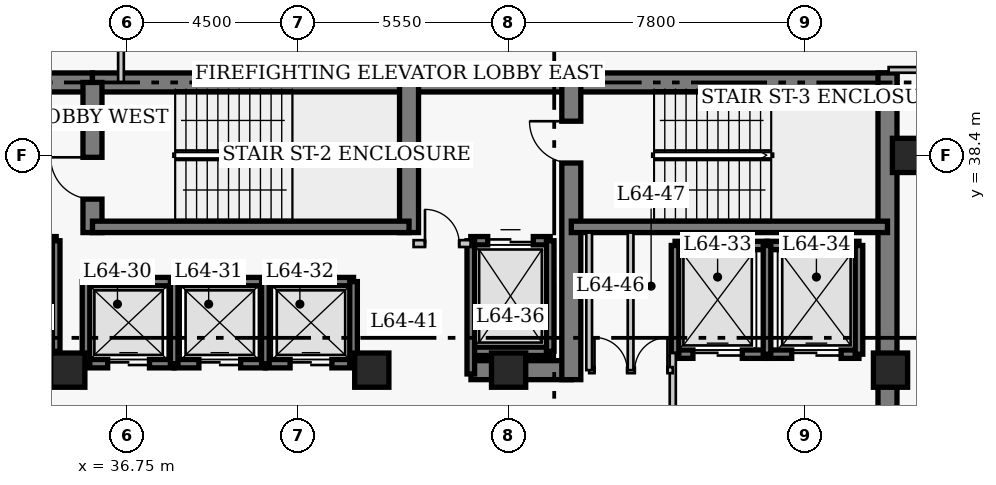
"""IFC4 building model, lengths in metres.
Left out: names, types, materials, properties, quantities, classifications, styles, units other than length and angle.
Written with IfcOpenShell. Run it as: python <this file> out.ifc"""

import sys

from ifc_helpers import new_model, si_unit, direction, frame, frame_2d, origin, origin_2d, place, context, subcontext, project, spatial, rectangle, extrude, element, fill, save


model = new_model("IFC4")
c1 = context("Model", 3, precision=1e-05, world=origin(), true_north=direction((0.0, 1.0)))
c2 = subcontext(c1, "Body", "Model", "MODEL_VIEW")
j1 = project(units=[si_unit("LENGTHUNIT", "METRE"), si_unit("PLANEANGLEUNIT", "RADIAN")], contexts=[c1])
p1 = place(None, origin())
s1 = spatial("IfcSite", under=j1, at=p1, CompositionType="ELEMENT")
p2 = place(p1, origin())
s2 = spatial("IfcBuilding", under=s1, at=p2, CompositionType="ELEMENT")
p3 = place(p2, frame((0.0, 0.0, 257.4)))
s3 = spatial("IfcBuildingStorey", under=s2, at=p3, CompositionType="ELEMENT", Elevation=257.4)
p4 = place(p3, frame((21.65, 40.32, 0.0), z_axis=(0.0, 0.0, 1.0), x_axis=(1.0, 0.0, 0.0)))
e1 = element("IfcWall", 1, at=p4, inside=s3, PredefinedType="SHEAR", context=c2, shape_type="SweptSolid", body=[
    extrude(rectangle(XDim=14.2, YDim=0.5, at=frame_2d((7.1, 0.0))), origin(), (0.0, 0.0, 1.0), 4.0),
])
p5 = place(p3, frame((35.85, 40.32, 0.0), z_axis=(0.0, 0.0, 1.0), x_axis=(1.0, 0.0, 0.0)))
e2 = element("IfcWall", 2, at=p5, inside=s3, PredefinedType="SHEAR", context=c2, shape_type="SweptSolid", body=[
    extrude(rectangle(XDim=12.6, YDim=0.5, at=frame_2d((6.3, 0.0))), origin(), (0.0, 0.0, 1.0), 4.0),
])
p6 = place(p3, frame((48.45, 40.32, 0.0), z_axis=(0.0, 0.0, 1.0), x_axis=(1.0, 0.0, 0.0)))
e3 = element("IfcWall", 3, at=p6, inside=s3, PredefinedType="SHEAR", context=c2, shape_type="SweptSolid", body=[
    extrude(rectangle(XDim=8.57, YDim=0.5, at=frame_2d((4.285, 0.0))), origin(), (0.0, 0.0, 1.0), 4.0),
])
p7 = place(p3, frame((56.77, 27.05, 0.0), z_axis=(0.0, 0.0, 1.0), x_axis=(0.0, 1.0, 0.0)))
e4 = element("IfcWall", 4, at=p7, inside=s3, PredefinedType="SHEAR", context=c2, shape_type="SweptSolid", body=[
    extrude(rectangle(XDim=13.52, YDim=0.5, at=frame_2d((6.76, 0.0))), origin(), (0.0, 0.0, 1.0), 4.0),
])
p8 = place(p3, frame((45.81, 32.75, 0.0), z_axis=(0.0, 0.0, 1.0), x_axis=(1.0, 0.0, 0.0)))
e5 = element("IfcWall", 5, at=p8, inside=s3, PredefinedType="SHEAR", context=c2, shape_type="SweptSolid", body=[
    extrude(rectangle(XDim=2.64, YDim=0.5, at=frame_2d((1.32, 0.0))), origin(), (0.0, 0.0, 1.0), 4.0),
])
p9 = place(p3, frame((35.85, 36.37, 0.0), z_axis=(0.0, 0.0, 1.0), x_axis=(0.0, 1.0, 0.0)))
e6 = element("IfcWall", 6, at=p9, inside=s3, PredefinedType="SHEAR", context=c2, shape_type="SweptSolid", body=[
    extrude(rectangle(XDim=3.95, YDim=0.5, at=frame_2d((1.975, 0.0))), origin(), (0.0, 0.0, 1.0), 4.0),
])
p10 = place(p9, frame((0.88, 0.0, 0.0)))
e7 = element("IfcOpeningElement", 7, at=p10, cuts=e6, PredefinedType="OPENING", context=c2, shape_type="SweptSolid", body=[
    extrude(rectangle(XDim=1.1, YDim=2.15, at=frame_2d((0.55, 1.075))), frame((0.0, 0.26, 0.0), z_axis=(0.0, -1.0, 0.0), x_axis=(1.0, 0.0, 0.0)), (0.0, 0.0, 1.0), 0.52),
])
p11 = place(p3, frame((44.18, 36.37, 0.0), z_axis=(0.0, 0.0, 1.0), x_axis=(0.0, 1.0, 0.0)))
e8 = element("IfcWall", 8, at=p11, inside=s3, PredefinedType="SHEAR", context=c2, shape_type="SweptSolid", body=[
    extrude(rectangle(XDim=3.95, YDim=0.5, at=frame_2d((1.975, 0.0))), origin(), (0.0, 0.0, 1.0), 4.0),
])
p12 = place(p3, frame((48.45, 32.5, 0.0), z_axis=(0.0, 0.0, 1.0), x_axis=(0.0, 1.0, 0.0)))
e9 = element("IfcWall", 9, at=p12, inside=s3, PredefinedType="SHEAR", context=c2, shape_type="SweptSolid", body=[
    extrude(rectangle(XDim=7.82, YDim=0.5, at=frame_2d((3.91, 0.0))), origin(), (0.0, 0.0, 1.0), 4.0),
])
p13 = place(p12, frame((5.7, 0.0, 0.0)))
e10 = element("IfcOpeningElement", 10, at=p13, cuts=e9, PredefinedType="OPENING", context=c2, shape_type="SweptSolid", body=[
    extrude(rectangle(XDim=1.1, YDim=2.15, at=frame_2d((0.55, 1.075))), frame((0.0, 0.26, 0.0), z_axis=(0.0, -1.0, 0.0), x_axis=(1.0, 0.0, 0.0)), (0.0, 0.0, 1.0), 0.52),
])
p14 = place(p3, frame((35.85, 36.52, 0.0), z_axis=(0.0, 0.0, 1.0), x_axis=(1.0, 0.0, 0.0)))
e11 = element("IfcWall", 11, at=p14, inside=s3, PredefinedType="SHEAR", context=c2, shape_type="SweptSolid", body=[
    extrude(rectangle(XDim=8.33, YDim=0.3, at=frame_2d((4.165, 0.0))), origin(), (0.0, 0.0, 1.0), 4.0),
])
p15 = place(p3, frame((48.45, 36.52, 0.0), z_axis=(0.0, 0.0, 1.0), x_axis=(1.0, 0.0, 0.0)))
e12 = element("IfcWall", 12, at=p15, inside=s3, PredefinedType="SHEAR", context=c2, shape_type="SweptSolid", body=[
    extrude(rectangle(XDim=8.32, YDim=0.3, at=frame_2d((4.16, 0.0))), origin(), (0.0, 0.0, 1.0), 4.0),
])
for number, where, z_axis, x_axis in (
    (13, (57.35, 38.4, 0.0), (0.0, 0.0, 1.0), (1.0, 0.0, 0.0)),
    (14, (35.2, 32.75, 0.0), (0.0, 0.0, 1.0), (1.0, 0.0, 0.0)),
    (15, (43.2, 32.75, 0.0), (0.0, 0.0, 1.0), (1.0, 0.0, 0.0)),
    (16, (46.8, 32.75, 0.0), (0.0, 0.0, 1.0), (1.0, 0.0, 0.0)),
    (17, (56.85, 32.75, 0.0), (0.0, 0.0, 1.0), (1.0, 0.0, 0.0)),
):
    element("IfcColumn", number, at=place(p3, frame(where, z_axis=z_axis, x_axis=x_axis)), inside=s3, PredefinedType="COLUMN", context=c2, shape_type="SweptSolid", body=[
        extrude(rectangle(XDim=0.9, YDim=0.9, at=origin_2d()), origin(), (0.0, 0.0, 1.0), 4.0),
    ])
p16 = place(p3, frame((35.68, 35.08, 0.0), z_axis=(0.0, 0.0, 1.0), x_axis=(1.0, 0.0, 0.0)))
e18 = element("IfcWall", 18, at=p16, inside=s3, PredefinedType="SHEAR", context=c2, shape_type="SweptSolid", body=[
    extrude(rectangle(XDim=2.32, YDim=0.22, at=frame_2d((1.16, 0.0))), origin(), (0.0, 0.0, 1.0), 4.0),
])
p17 = place(p3, frame((35.68, 32.92, 0.0), z_axis=(0.0, 0.0, 1.0), x_axis=(1.0, 0.0, 0.0)))
e19 = element("IfcWall", 19, at=p17, inside=s3, PredefinedType="SHEAR", context=c2, shape_type="SweptSolid", body=[
    extrude(rectangle(XDim=2.32, YDim=0.22, at=frame_2d((1.16, 0.0))), origin(), (0.0, 0.0, 1.0), 4.0),
])
p18 = place(p17, frame((0.57, 0.0, 0.0)))
e20 = element("IfcOpeningElement", 20, at=p18, cuts=e19, PredefinedType="OPENING", context=c2, shape_type="SweptSolid", body=[
    extrude(rectangle(XDim=1.1, YDim=2.15, at=frame_2d((0.55, 1.075))), frame((0.0, 0.12, 0.0), z_axis=(0.0, -1.0, 0.0), x_axis=(1.0, 0.0, 0.0)), (0.0, 0.0, 1.0), 0.24),
])
p19 = place(p3, frame((35.68, 32.92, 0.0), z_axis=(0.0, 0.0, 1.0), x_axis=(0.0, 1.0, 0.0)))
e21 = element("IfcWall", 21, at=p19, inside=s3, PredefinedType="SHEAR", context=c2, shape_type="SweptSolid", body=[
    extrude(rectangle(XDim=2.16, YDim=0.2, at=frame_2d((1.08, 0.0))), origin(), (0.0, 0.0, 1.0), 4.0),
])
p20 = place(p3, frame((38.0, 35.08, 0.0), z_axis=(0.0, 0.0, 1.0), x_axis=(1.0, 0.0, 0.0)))
e22 = element("IfcWall", 22, at=p20, inside=s3, PredefinedType="SHEAR", context=c2, shape_type="SweptSolid", body=[
    extrude(rectangle(XDim=2.4, YDim=0.22, at=frame_2d((1.2, 0.0))), origin(), (0.0, 0.0, 1.0), 4.0),
])
p21 = place(p3, frame((38.0, 32.92, 0.0), z_axis=(0.0, 0.0, 1.0), x_axis=(1.0, 0.0, 0.0)))
e23 = element("IfcWall", 23, at=p21, inside=s3, PredefinedType="SHEAR", context=c2, shape_type="SweptSolid", body=[
    extrude(rectangle(XDim=2.4, YDim=0.22, at=frame_2d((1.2, 0.0))), origin(), (0.0, 0.0, 1.0), 4.0),
])
p22 = place(p21, frame((0.65, 0.0, 0.0)))
e24 = element("IfcOpeningElement", 24, at=p22, cuts=e23, PredefinedType="OPENING", context=c2, shape_type="SweptSolid", body=[
    extrude(rectangle(XDim=1.1, YDim=2.15, at=frame_2d((0.55, 1.075))), frame((0.0, 0.12, 0.0), z_axis=(0.0, -1.0, 0.0), x_axis=(1.0, 0.0, 0.0)), (0.0, 0.0, 1.0), 0.24),
])
p23 = place(p3, frame((38.0, 32.92, 0.0), z_axis=(0.0, 0.0, 1.0), x_axis=(0.0, 1.0, 0.0)))
e25 = element("IfcWall", 25, at=p23, inside=s3, PredefinedType="SHEAR", context=c2, shape_type="SweptSolid", body=[
    extrude(rectangle(XDim=2.16, YDim=0.2, at=frame_2d((1.08, 0.0))), origin(), (0.0, 0.0, 1.0), 4.0),
])
p24 = place(p3, frame((40.4, 35.08, 0.0), z_axis=(0.0, 0.0, 1.0), x_axis=(1.0, 0.0, 0.0)))
e26 = element("IfcWall", 26, at=p24, inside=s3, PredefinedType="SHEAR", context=c2, shape_type="SweptSolid", body=[
    extrude(rectangle(XDim=2.32, YDim=0.22, at=frame_2d((1.16, 0.0))), origin(), (0.0, 0.0, 1.0), 4.0),
])
p25 = place(p3, frame((40.4, 32.92, 0.0), z_axis=(0.0, 0.0, 1.0), x_axis=(1.0, 0.0, 0.0)))
e27 = element("IfcWall", 27, at=p25, inside=s3, PredefinedType="SHEAR", context=c2, shape_type="SweptSolid", body=[
    extrude(rectangle(XDim=2.32, YDim=0.22, at=frame_2d((1.16, 0.0))), origin(), (0.0, 0.0, 1.0), 4.0),
])
p26 = place(p25, frame((0.65, 0.0, 0.0)))
e28 = element("IfcOpeningElement", 28, at=p26, cuts=e27, PredefinedType="OPENING", context=c2, shape_type="SweptSolid", body=[
    extrude(rectangle(XDim=1.1, YDim=2.15, at=frame_2d((0.55, 1.075))), frame((0.0, 0.12, 0.0), z_axis=(0.0, -1.0, 0.0), x_axis=(1.0, 0.0, 0.0)), (0.0, 0.0, 1.0), 0.24),
])
for number, where, z_axis, x_axis in (
    (29, (40.4, 32.92, 0.0), (0.0, 0.0, 1.0), (0.0, 1.0, 0.0)),
    (30, (42.72, 32.92, 0.0), (0.0, 0.0, 1.0), (0.0, 1.0, 0.0)),
):
    element("IfcWall", number, at=place(p3, frame(where, z_axis=z_axis, x_axis=x_axis)), inside=s3, PredefinedType="SHEAR", context=c2, shape_type="SweptSolid", body=[
        extrude(rectangle(XDim=2.16, YDim=0.2, at=frame_2d((1.08, 0.0))), origin(), (0.0, 0.0, 1.0), 4.0),
    ])
p27 = place(p3, frame((51.18, 36.03, 0.0), z_axis=(0.0, 0.0, 1.0), x_axis=(1.0, 0.0, 0.0)))
e31 = element("IfcWall", 31, at=p27, inside=s3, PredefinedType="SHEAR", context=c2, shape_type="SweptSolid", body=[
    extrude(rectangle(XDim=2.42, YDim=0.22, at=frame_2d((1.21, 0.0))), origin(), (0.0, 0.0, 1.0), 4.0),
])
p28 = place(p3, frame((51.18, 33.17, 0.0), z_axis=(0.0, 0.0, 1.0), x_axis=(1.0, 0.0, 0.0)))
e32 = element("IfcWall", 32, at=p28, inside=s3, PredefinedType="SHEAR", context=c2, shape_type="SweptSolid", body=[
    extrude(rectangle(XDim=2.42, YDim=0.22, at=frame_2d((1.21, 0.0))), origin(), (0.0, 0.0, 1.0), 4.0),
])
p29 = place(p28, frame((0.47, 0.0, 0.0)))
e33 = element("IfcOpeningElement", 33, at=p29, cuts=e32, PredefinedType="OPENING", context=c2, shape_type="SweptSolid", body=[
    extrude(rectangle(XDim=1.3, YDim=2.15, at=frame_2d((0.65, 1.075))), frame((0.0, 0.12, 0.0), z_axis=(0.0, -1.0, 0.0), x_axis=(1.0, 0.0, 0.0)), (0.0, 0.0, 1.0), 0.24),
])
p30 = place(p3, frame((51.18, 33.17, 0.0), z_axis=(0.0, 0.0, 1.0), x_axis=(0.0, 1.0, 0.0)))
e34 = element("IfcWall", 34, at=p30, inside=s3, PredefinedType="SHEAR", context=c2, shape_type="SweptSolid", body=[
    extrude(rectangle(XDim=2.86, YDim=0.2, at=frame_2d((1.43, 0.0))), origin(), (0.0, 0.0, 1.0), 4.0),
])
p31 = place(p3, frame((53.6, 36.03, 0.0), z_axis=(0.0, 0.0, 1.0), x_axis=(1.0, 0.0, 0.0)))
e35 = element("IfcWall", 35, at=p31, inside=s3, PredefinedType="SHEAR", context=c2, shape_type="SweptSolid", body=[
    extrude(rectangle(XDim=2.42, YDim=0.22, at=frame_2d((1.21, 0.0))), origin(), (0.0, 0.0, 1.0), 4.0),
])
p32 = place(p3, frame((53.6, 33.17, 0.0), z_axis=(0.0, 0.0, 1.0), x_axis=(1.0, 0.0, 0.0)))
e36 = element("IfcWall", 36, at=p32, inside=s3, PredefinedType="SHEAR", context=c2, shape_type="SweptSolid", body=[
    extrude(rectangle(XDim=2.42, YDim=0.22, at=frame_2d((1.21, 0.0))), origin(), (0.0, 0.0, 1.0), 4.0),
])
p33 = place(p32, frame((0.65, 0.0, 0.0)))
e37 = element("IfcOpeningElement", 37, at=p33, cuts=e36, PredefinedType="OPENING", context=c2, shape_type="SweptSolid", body=[
    extrude(rectangle(XDim=1.3, YDim=2.15, at=frame_2d((0.65, 1.075))), frame((0.0, 0.12, 0.0), z_axis=(0.0, -1.0, 0.0), x_axis=(1.0, 0.0, 0.0)), (0.0, 0.0, 1.0), 0.24),
])
for number, where, z_axis, x_axis in (
    (38, (53.6, 33.17, 0.0), (0.0, 0.0, 1.0), (0.0, 1.0, 0.0)),
    (39, (56.02, 33.17, 0.0), (0.0, 0.0, 1.0), (0.0, 1.0, 0.0)),
):
    element("IfcWall", number, at=place(p3, frame(where, z_axis=z_axis, x_axis=x_axis)), inside=s3, PredefinedType="SHEAR", context=c2, shape_type="SweptSolid", body=[
        extrude(rectangle(XDim=2.86, YDim=0.2, at=frame_2d((1.43, 0.0))), origin(), (0.0, 0.0, 1.0), 4.0),
    ])
p34 = place(p3, frame((32.805, 36.155, 0.0), z_axis=(0.0, 0.0, 1.0), x_axis=(1.0, 0.0, 0.0)))
e40 = element("IfcWall", 40, at=p34, inside=s3, PredefinedType="SHEAR", context=c2, shape_type="SweptSolid", body=[
    extrude(rectangle(XDim=2.09, YDim=0.22, at=frame_2d((1.045, 0.0))), origin(), (0.0, 0.0, 1.0), 4.0),
])
p35 = place(p34, frame((0.445, 0.0, 0.0)))
e41 = element("IfcOpeningElement", 41, at=p35, cuts=e40, PredefinedType="OPENING", context=c2, shape_type="SweptSolid", body=[
    extrude(rectangle(XDim=1.2, YDim=2.15, at=frame_2d((0.6, 1.075))), frame((0.0, 0.12, 0.0), z_axis=(0.0, -1.0, 0.0), x_axis=(1.0, 0.0, 0.0)), (0.0, 0.0, 1.0), 0.24),
])
p36 = place(p3, frame((32.805, 33.245, 0.0), z_axis=(0.0, 0.0, 1.0), x_axis=(1.0, 0.0, 0.0)))
e42 = element("IfcWall", 42, at=p36, inside=s3, PredefinedType="SHEAR", context=c2, shape_type="SweptSolid", body=[
    extrude(rectangle(XDim=2.09, YDim=0.22, at=frame_2d((1.045, 0.0))), origin(), (0.0, 0.0, 1.0), 4.0),
])
p37 = place(p3, frame((34.895, 33.245, 0.0), z_axis=(0.0, 0.0, 1.0), x_axis=(0.0, 1.0, 0.0)))
e43 = element("IfcWall", 43, at=p37, inside=s3, PredefinedType="SHEAR", context=c2, shape_type="SweptSolid", body=[
    extrude(rectangle(XDim=2.91, YDim=0.2, at=frame_2d((1.455, 0.0))), origin(), (0.0, 0.0, 1.0), 4.0),
])
p38 = place(p3, frame((45.805, 36.155, 0.0), z_axis=(0.0, 0.0, 1.0), x_axis=(1.0, 0.0, 0.0)))
e44 = element("IfcWall", 44, at=p38, inside=s3, PredefinedType="SHEAR", context=c2, shape_type="SweptSolid", body=[
    extrude(rectangle(XDim=2.09, YDim=0.22, at=frame_2d((1.045, 0.0))), origin(), (0.0, 0.0, 1.0), 4.0),
])
p39 = place(p38, frame((0.445, 0.0, 0.0)))
e45 = element("IfcOpeningElement", 45, at=p39, cuts=e44, PredefinedType="OPENING", context=c2, shape_type="SweptSolid", body=[
    extrude(rectangle(XDim=1.2, YDim=2.15, at=frame_2d((0.6, 1.075))), frame((0.0, 0.12, 0.0), z_axis=(0.0, -1.0, 0.0), x_axis=(1.0, 0.0, 0.0)), (0.0, 0.0, 1.0), 0.24),
])
p40 = place(p3, frame((45.805, 33.245, 0.0), z_axis=(0.0, 0.0, 1.0), x_axis=(1.0, 0.0, 0.0)))
e46 = element("IfcWall", 46, at=p40, inside=s3, PredefinedType="SHEAR", context=c2, shape_type="SweptSolid", body=[
    extrude(rectangle(XDim=2.09, YDim=0.22, at=frame_2d((1.045, 0.0))), origin(), (0.0, 0.0, 1.0), 4.0),
])
p41 = place(p3, frame((45.805, 32.65, 0.0), z_axis=(0.0, 0.0, 1.0), x_axis=(0.0, 1.0, 0.0)))
e47 = element("IfcWall", 47, at=p41, inside=s3, PredefinedType="SHEAR", context=c2, shape_type="SweptSolid", body=[
    extrude(rectangle(XDim=3.505, YDim=0.2, at=frame_2d((1.752, 0.0))), origin(), (0.0, 0.0, 1.0), 4.0),
])
p42 = place(p3, frame((47.895, 33.245, 0.0), z_axis=(0.0, 0.0, 1.0), x_axis=(0.0, 1.0, 0.0)))
e48 = element("IfcWall", 48, at=p42, inside=s3, PredefinedType="SHEAR", context=c2, shape_type="SweptSolid", body=[
    extrude(rectangle(XDim=2.91, YDim=0.2, at=frame_2d((1.455, 0.0))), origin(), (0.0, 0.0, 1.0), 4.0),
])
p43 = place(p3, frame((44.3, 36.08, 0.0), z_axis=(0.0, 0.0, 1.0), x_axis=(1.0, 0.0, 0.0)))
e49 = element("IfcWall", 49, at=p43, inside=s3, PredefinedType="PARTITIONING", context=c2, shape_type="SweptSolid", body=[
    extrude(rectangle(XDim=1.5, YDim=0.18, at=frame_2d((0.75, 0.0))), origin(), (0.0, 0.0, 1.0), 3.76),
])
p44 = place(p43, frame((0.3, 0.0, 0.0)))
e50 = element("IfcOpeningElement", 50, at=p44, cuts=e49, PredefinedType="OPENING", context=c2, shape_type="SweptSolid", body=[
    extrude(rectangle(XDim=0.9, YDim=2.15, at=frame_2d((0.45, 1.075))), frame((0.0, 0.1, 0.0), z_axis=(0.0, -1.0, 0.0), x_axis=(1.0, 0.0, 0.0)), (0.0, 0.0, 1.0), 0.2),
])
p45 = place(p3, frame((51.12, 29.5, 0.0), z_axis=(0.0, 0.0, 1.0), x_axis=(0.0, 1.0, 0.0)))
e51 = element("IfcWall", 51, at=p45, inside=s3, PredefinedType="PARTITIONING", context=c2, shape_type="SweptSolid", body=[
    extrude(rectangle(XDim=3.7, YDim=0.16, at=frame_2d((1.85, 0.0))), origin(), (0.0, 0.0, 1.0), 3.76),
])
p46 = place(p45, frame((0.9, 0.0, 0.0)))
e52 = element("IfcOpeningElement", 52, at=p46, cuts=e51, PredefinedType="OPENING", context=c2, shape_type="SweptSolid", body=[
    extrude(rectangle(XDim=1.1, YDim=2.15, at=frame_2d((0.55, 1.075))), frame((0.0, 0.09, 0.0), z_axis=(0.0, -1.0, 0.0), x_axis=(1.0, 0.0, 0.0)), (0.0, 0.0, 1.0), 0.18),
])
p47 = place(p3, frame((48.92, 32.75, 0.0), z_axis=(0.0, 0.0, 1.0), x_axis=(1.0, 0.0, 0.0)))
e53 = element("IfcWall", 53, at=p47, inside=s3, PredefinedType="PARTITIONING", context=c2, shape_type="SweptSolid", body=[
    extrude(rectangle(XDim=2.2, YDim=0.16, at=frame_2d((1.1, 0.0))), origin(), (0.0, 0.0, 1.0), 3.76),
])
p48 = place(p47, frame((0.14, 0.0, 0.0)))
e54 = element("IfcOpeningElement", 54, at=p48, cuts=e53, PredefinedType="OPENING", context=c2, shape_type="SweptSolid", body=[
    extrude(rectangle(XDim=0.86, YDim=2.05, at=frame_2d((0.43, 1.025))), frame((0.0, 0.09, 0.0), z_axis=(0.0, -1.0, 0.0), x_axis=(1.0, 0.0, 0.0)), (0.0, 0.0, 1.0), 0.18),
])
p49 = place(p47, frame((1.2, 0.0, 0.0)))
e55 = element("IfcOpeningElement", 55, at=p49, cuts=e53, PredefinedType="OPENING", context=c2, shape_type="SweptSolid", body=[
    extrude(rectangle(XDim=0.86, YDim=2.05, at=frame_2d((0.43, 1.025))), frame((0.0, 0.09, 0.0), z_axis=(0.0, -1.0, 0.0), x_axis=(1.0, 0.0, 0.0)), (0.0, 0.0, 1.0), 0.18),
])
for number, where, z_axis, x_axis in (
    (56, (48.92, 32.75, 0.0), (0.0, 0.0, 1.0), (0.0, 1.0, 0.0)),
    (57, (50.01, 32.75, 0.0), (0.0, 0.0, 1.0), (0.0, 1.0, 0.0)),
):
    element("IfcWall", number, at=place(p3, frame(where, z_axis=z_axis, x_axis=x_axis)), inside=s3, PredefinedType="PARTITIONING", context=c2, shape_type="SweptSolid", body=[
        extrude(rectangle(XDim=3.62, YDim=0.15, at=frame_2d((1.81, 0.0))), origin(), (0.0, 0.0, 1.0), 3.76),
    ])
p50 = place(p3, frame((56.8, 40.65, 0.0), z_axis=(0.0, 0.0, 1.0), x_axis=(1.0, 0.0, 0.0)))
e58 = element("IfcWall", 58, at=p50, inside=s3, PredefinedType="PARTITIONING", context=c2, shape_type="SweptSolid", body=[
    extrude(rectangle(XDim=3.81, YDim=0.15, at=frame_2d((1.905, 0.0))), origin(), (0.0, 0.0, 1.0), 3.76),
])
p51 = place(p50, frame((2.2, 0.0, 0.0)))
e59 = element("IfcOpeningElement", 59, at=p51, cuts=e58, PredefinedType="OPENING", context=c2, shape_type="SweptSolid", body=[
    extrude(rectangle(XDim=1.0, YDim=2.15, at=frame_2d((0.5, 1.075))), frame((0.0, 0.085, 0.0), z_axis=(0.0, -1.0, 0.0), x_axis=(1.0, 0.0, 0.0)), (0.0, 0.0, 1.0), 0.17),
])
p52 = place(p3, frame((36.6, 40.32, 0.0), z_axis=(0.0, 0.0, 1.0), x_axis=(0.0, 1.0, 0.0)))
e60 = element("IfcWall", 60, at=p52, inside=s3, PredefinedType="PARTITIONING", context=c2, shape_type="SweptSolid", body=[
    extrude(rectangle(XDim=3.545, YDim=0.15, at=frame_2d((1.772, 0.0))), origin(), (0.0, 0.0, 1.0), 3.76),
])
p53 = place(p18, origin())
e61 = element("IfcDoor", 61, at=p53, inside=s3, OperationType="DOUBLE_DOOR_SLIDING", PredefinedType="DOOR", context=c2, shape_type="SweptSolid", body=[
    extrude(rectangle(XDim=1.1, YDim=2.15, at=frame_2d((0.55, 1.075))), frame((0.0, 0.025, 0.0), z_axis=(0.0, -1.0, 0.0), x_axis=(1.0, 0.0, 0.0)), (0.0, 0.0, 1.0), 0.05),
])
fill(e20, e61)
p54 = place(p22, origin())
e62 = element("IfcDoor", 62, at=p54, inside=s3, OperationType="DOUBLE_DOOR_SLIDING", PredefinedType="DOOR", context=c2, shape_type="SweptSolid", body=[
    extrude(rectangle(XDim=1.1, YDim=2.15, at=frame_2d((0.55, 1.075))), frame((0.0, 0.025, 0.0), z_axis=(0.0, -1.0, 0.0), x_axis=(1.0, 0.0, 0.0)), (0.0, 0.0, 1.0), 0.05),
])
fill(e24, e62)
p55 = place(p26, origin())
e63 = element("IfcDoor", 63, at=p55, inside=s3, OperationType="DOUBLE_DOOR_SLIDING", PredefinedType="DOOR", context=c2, shape_type="SweptSolid", body=[
    extrude(rectangle(XDim=1.1, YDim=2.15, at=frame_2d((0.55, 1.075))), frame((0.0, 0.025, 0.0), z_axis=(0.0, -1.0, 0.0), x_axis=(1.0, 0.0, 0.0)), (0.0, 0.0, 1.0), 0.05),
])
fill(e28, e63)
p56 = place(p29, origin())
e64 = element("IfcDoor", 64, at=p56, inside=s3, OperationType="DOUBLE_DOOR_SLIDING", PredefinedType="DOOR", context=c2, shape_type="SweptSolid", body=[
    extrude(rectangle(XDim=1.3, YDim=2.15, at=frame_2d((0.65, 1.075))), frame((0.0, 0.025, 0.0), z_axis=(0.0, -1.0, 0.0), x_axis=(1.0, 0.0, 0.0)), (0.0, 0.0, 1.0), 0.05),
])
fill(e33, e64)
p57 = place(p33, origin())
e65 = element("IfcDoor", 65, at=p57, inside=s3, OperationType="DOUBLE_DOOR_SLIDING", PredefinedType="DOOR", context=c2, shape_type="SweptSolid", body=[
    extrude(rectangle(XDim=1.3, YDim=2.15, at=frame_2d((0.65, 1.075))), frame((0.0, 0.025, 0.0), z_axis=(0.0, -1.0, 0.0), x_axis=(1.0, 0.0, 0.0)), (0.0, 0.0, 1.0), 0.05),
])
fill(e37, e65)
p58 = place(p39, origin())
e66 = element("IfcDoor", 66, at=p58, inside=s3, OperationType="DOUBLE_DOOR_SLIDING", PredefinedType="DOOR", context=c2, shape_type="SweptSolid", body=[
    extrude(rectangle(XDim=1.2, YDim=2.15, at=frame_2d((0.6, 1.075))), frame((0.0, 0.025, 0.0), z_axis=(0.0, -1.0, 0.0), x_axis=(1.0, 0.0, 0.0)), (0.0, 0.0, 1.0), 0.05),
])
fill(e45, e66)
p59 = place(p44, origin())
e67 = element("IfcDoor", 67, at=p59, inside=s3, OperationType="SINGLE_SWING_LEFT", PredefinedType="DOOR", context=c2, shape_type="SweptSolid", body=[
    extrude(rectangle(XDim=0.9, YDim=2.15, at=frame_2d((0.45, 1.075))), frame((0.0, 0.025, 0.0), z_axis=(0.0, -1.0, 0.0), x_axis=(1.0, 0.0, 0.0)), (0.0, 0.0, 1.0), 0.05),
])
fill(e50, e67)
p60 = place(p48, origin())
e68 = element("IfcDoor", 68, at=p60, inside=s3, OperationType="SINGLE_SWING_LEFT", PredefinedType="DOOR", context=c2, shape_type="SweptSolid", body=[
    extrude(rectangle(XDim=0.86, YDim=2.05, at=frame_2d((0.43, 1.025))), frame((0.0, 0.025, 0.0), z_axis=(0.0, -1.0, 0.0), x_axis=(1.0, 0.0, 0.0)), (0.0, 0.0, 1.0), 0.05),
])
fill(e54, e68)
p61 = place(p49, origin())
e69 = element("IfcDoor", 69, at=p61, inside=s3, OperationType="SINGLE_SWING_RIGHT", PredefinedType="DOOR", context=c2, shape_type="SweptSolid", body=[
    extrude(rectangle(XDim=0.86, YDim=2.05, at=frame_2d((0.43, 1.025))), frame((0.0, 0.025, 0.0), z_axis=(0.0, -1.0, 0.0), x_axis=(1.0, 0.0, 0.0)), (0.0, 0.0, 1.0), 0.05),
])
fill(e55, e69)
p62 = place(p10, origin())
e70 = element("IfcDoor", 70, at=p62, inside=s3, OperationType="SINGLE_SWING_RIGHT", PredefinedType="DOOR", context=c2, shape_type="SweptSolid", body=[
    extrude(rectangle(XDim=1.1, YDim=2.15, at=frame_2d((0.55, 1.075))), frame((0.0, 0.025, 0.0), z_axis=(0.0, -1.0, 0.0), x_axis=(1.0, 0.0, 0.0)), (0.0, 0.0, 1.0), 0.05),
])
fill(e7, e70)
p63 = place(p13, origin())
e71 = element("IfcDoor", 71, at=p63, inside=s3, OperationType="SINGLE_SWING_RIGHT", PredefinedType="DOOR", context=c2, shape_type="SweptSolid", body=[
    extrude(rectangle(XDim=1.1, YDim=2.15, at=frame_2d((0.55, 1.075))), frame((0.0, 0.025, 0.0), z_axis=(0.0, -1.0, 0.0), x_axis=(1.0, 0.0, 0.0)), (0.0, 0.0, 1.0), 0.05),
])
fill(e10, e71)
save(model, sys.argv[1])
